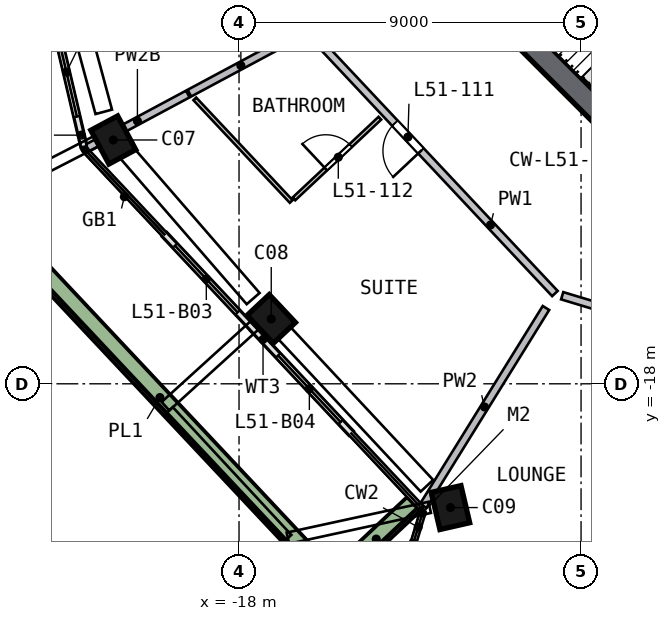
"""IFC4 building model, lengths in metres.
Left out: names, types, materials, properties, quantities, classifications, styles, units other than length and angle.
Written with IfcOpenShell. Run it as: python <this file> out.ifc"""

import sys

from ifc_helpers import new_model, si_unit, direction, frame, frame_2d, origin, origin_2d, place, context, subcontext, project, spatial, rectangle, extrude, element, fill, save


model = new_model("IFC4")
c1 = context("Model", 3, precision=1e-05, world=origin(), true_north=direction((0.0, 1.0)))
c2 = subcontext(c1, "Body", "Model", "MODEL_VIEW")
j1 = project(units=[si_unit("LENGTHUNIT", "METRE"), si_unit("PLANEANGLEUNIT", "RADIAN")], contexts=[c1])
p1 = place(None, origin())
s1 = spatial("IfcSite", under=j1, at=p1, CompositionType="ELEMENT")
p2 = place(p1, origin())
s2 = spatial("IfcBuilding", under=s1, at=p2, CompositionType="ELEMENT")
p3 = place(p2, frame((0.0, 0.0, 209.0)))
s3 = spatial("IfcBuildingStorey", under=s2, at=p3, CompositionType="ELEMENT", Elevation=209.0)
p4 = place(p3, frame((-21.376, -11.462, 0.0), z_axis=(0.055345312, -0.101187651, 0.993326711), x_axis=(-0.469249686, 0.875501932, 0.115330388)))
e1 = element("IfcColumn", 1, at=p4, inside=s3, PredefinedType="COLUMN", context=c2, shape_type="SweptSolid", body=[
    extrude(rectangle(XDim=1.0, YDim=0.8, at=origin_2d()), origin(), (0.0, 0.0, 1.0), 3.211),
])
p5 = place(p3, frame((-17.246, -16.195, 0.0), z_axis=(0.077721499, -0.081371824, 0.993648829), x_axis=(0.68019237, -0.724346074, -0.112521575)))
e2 = element("IfcColumn", 2, at=p5, inside=s3, PredefinedType="COLUMN", context=c2, shape_type="SweptSolid", body=[
    extrude(rectangle(XDim=1.0, YDim=0.8, at=origin_2d()), origin(), (0.0, 0.0, 1.0), 3.21),
])
p6 = place(p3, frame((-12.56, -21.186, 0.0), z_axis=(0.101242684, -0.058830208, 0.993120801), x_axis=(-0.221269095, 0.971915118, 0.080131083)))
e3 = element("IfcColumn", 3, at=p6, inside=s3, PredefinedType="COLUMN", context=c2, shape_type="SweptSolid", body=[
    extrude(rectangle(XDim=1.0, YDim=0.8, at=origin_2d()), origin(), (0.0, 0.0, 1.0), 3.212),
])
p7 = place(p3, frame((-13.788, -5.587, 0.0), z_axis=(0.0, 0.0, 1.0), x_axis=(0.707106781, -0.707106781, 0.0)))
e4 = element("IfcWall", 4, at=p7, inside=s3, PredefinedType="SHEAR", context=c2, shape_type="SweptSolid", body=[
    extrude(rectangle(XDim=11.598, YDim=0.6, at=frame_2d((5.799, 0.0))), origin(), (0.0, 0.0, 1.0), 3.5),
])
p8 = place(p7, frame((2.099, 0.0, 0.0)))
e5 = element("IfcOpeningElement", 5, at=p8, cuts=e4, PredefinedType="OPENING", context=c2, shape_type="SweptSolid", body=[
    extrude(rectangle(XDim=1.2, YDim=2.1, at=frame_2d((0.6, 1.05))), frame((0.0, 0.31, 0.0), z_axis=(0.0, -1.0, 0.0), x_axis=(1.0, 0.0, 0.0)), (0.0, 0.0, 1.0), 0.62),
])
p9 = place(p3, frame((-22.907, -8.24, 0.0), z_axis=(0.0, 0.0, 1.0), x_axis=(0.228341634, -0.973581069, 0.0)))
e6 = element("IfcWall", 6, at=p9, inside=s3, PredefinedType="SOLIDWALL", context=c2, shape_type="SweptSolid", body=[
    extrude(rectangle(XDim=3.608, YDim=0.15, at=frame_2d((1.804, 0.0))), origin(), (0.0, 0.0, 1.0), 2.475),
])
p10 = place(p9, frame((0.4, 0.0, 0.0)))
e7 = element("IfcOpeningElement", 7, at=p10, cuts=e6, PredefinedType="OPENING", context=c2, shape_type="SweptSolid", body=[
    extrude(rectangle(XDim=2.4, YDim=2.4, at=frame_2d((1.2, 1.2))), frame((0.0, 0.085, 0.0), z_axis=(0.0, -1.0, 0.0), x_axis=(1.0, 0.0, 0.0)), (0.0, 0.0, 1.0), 0.17),
])
p11 = place(p3, frame((-19.956, -14.076, 0.0), z_axis=(0.0, 0.0, 1.0), x_axis=(0.684533271, -0.728981619, 0.0)))
e8 = element("IfcWall", 8, at=p11, inside=s3, PredefinedType="SOLIDWALL", context=c2, shape_type="SweptSolid", body=[
    extrude(rectangle(XDim=3.4, YDim=0.15, at=frame_2d((1.7, 0.0))), origin(), (0.0, 0.0, 1.0), 2.475),
])
p12 = place(p11, frame((0.4, 0.0, 0.0)))
e9 = element("IfcOpeningElement", 9, at=p12, cuts=e8, PredefinedType="OPENING", context=c2, shape_type="SweptSolid", body=[
    extrude(rectangle(XDim=2.4, YDim=2.4, at=frame_2d((1.2, 1.2))), frame((0.0, 0.085, 0.0), z_axis=(0.0, -1.0, 0.0), x_axis=(1.0, 0.0, 0.0)), (0.0, 0.0, 1.0), 0.17),
])
p13 = place(p3, frame((-17.629, -16.555, 0.0), z_axis=(0.0, 0.0, 1.0), x_axis=(0.684558422, -0.728958001, 0.0)))
e10 = element("IfcWall", 10, at=p13, inside=s3, PredefinedType="SOLIDWALL", context=c2, shape_type="SweptSolid", body=[
    extrude(rectangle(XDim=3.761, YDim=0.15, at=frame_2d((1.881, 0.0))), origin(), (0.0, 0.0, 1.0), 2.475),
])
p14 = place(p13, frame((0.961, 0.0, 0.0)))
e11 = element("IfcOpeningElement", 11, at=p14, cuts=e10, PredefinedType="OPENING", context=c2, shape_type="SweptSolid", body=[
    extrude(rectangle(XDim=2.4, YDim=2.4, at=frame_2d((1.2, 1.2))), frame((0.0, 0.085, 0.0), z_axis=(0.0, -1.0, 0.0), x_axis=(1.0, 0.0, 0.0)), (0.0, 0.0, 1.0), 0.17),
])
p15 = place(p3, frame((-24.779, -13.36, 0.0), z_axis=(0.0, 0.0, 1.0), x_axis=(0.68453799, -0.728977188, 0.0)))
e12 = element("IfcWall", 12, at=p15, inside=s3, PredefinedType="SOLIDWALL", context=c2, shape_type="SweptSolid", body=[
    extrude(rectangle(XDim=13.724, YDim=0.5, at=frame_2d((6.862, 0.0))), origin(), (0.0, 0.0, 1.0), 0.7),
])
p16 = place(p3, frame((-15.373, -23.01, 0.0), z_axis=(0.0, 0.0, 1.0), x_axis=(0.728964327, 0.684551685, 0.0)))
e13 = element("IfcWall", 13, at=p16, inside=s3, PredefinedType="SOLIDWALL", context=c2, shape_type="SweptSolid", body=[
    extrude(rectangle(XDim=2.699, YDim=0.5, at=frame_2d((1.35, 0.0))), origin(), (0.0, 0.0, 1.0), 0.7),
])
p17 = place(p3, frame((-3.535, -9.334, 0.0), z_axis=(0.0, 0.0, 1.0), x_axis=(-0.707120946, 0.707092617, 0.0)))
e14 = element("IfcWall", 14, at=p17, inside=s3, PredefinedType="SOLIDWALL", context=c2, shape_type="SweptSolid", body=[
    extrude(rectangle(XDim=8.618, YDim=0.2, at=frame_2d((4.309, 0.0))), origin(), (0.0, 0.0, 1.0), 3.19),
])
p18 = place(p17, frame((6.6, 0.0, 0.0)))
e15 = element("IfcOpeningElement", 15, at=p18, cuts=e14, PredefinedType="OPENING", context=c2, shape_type="SweptSolid", body=[
    extrude(rectangle(XDim=1.2, YDim=2.1, at=frame_2d((0.6, 1.05))), frame((0.0, 0.11, 0.0), z_axis=(0.0, -1.0, 0.0), x_axis=(1.0, 0.0, 0.0)), (0.0, 0.0, 1.0), 0.22),
])
p19 = place(p3, frame((-9.688, -15.625, 0.0), z_axis=(0.0, 0.0, 1.0), x_axis=(-0.684549323, 0.728966545, 0.0)))
e16 = element("IfcWall", 16, at=p19, inside=s3, PredefinedType="SOLIDWALL", context=c2, shape_type="SweptSolid", body=[
    extrude(rectangle(XDim=9.317, YDim=0.2, at=frame_2d((4.658, 0.0))), origin(), (0.0, 0.0, 1.0), 3.19),
])
p20 = place(p19, frame((5.15, 0.0, 0.0)))
e17 = element("IfcOpeningElement", 17, at=p20, cuts=e16, PredefinedType="OPENING", context=c2, shape_type="SweptSolid", body=[
    extrude(rectangle(XDim=1.0, YDim=2.1, at=frame_2d((0.5, 1.05))), frame((0.0, 0.11, 0.0), z_axis=(0.0, -1.0, 0.0), x_axis=(1.0, 0.0, 0.0)), (0.0, 0.0, 1.0), 0.22),
])
p21 = place(p3, frame((-0.577, -18.376, 0.0), z_axis=(0.0, 0.0, 1.0), x_axis=(-0.957319229, 0.289032685, 0.0)))
e18 = element("IfcWall", 18, at=p21, inside=s3, PredefinedType="SOLIDWALL", context=c2, shape_type="SweptSolid", body=[
    extrude(rectangle(XDim=9.317, YDim=0.2, at=frame_2d((4.658, 0.0))), origin(), (0.0, 0.0, 1.0), 3.19),
])
p22 = place(p21, frame((3.869, 0.0, 0.0)))
e19 = element("IfcOpeningElement", 19, at=p22, cuts=e18, PredefinedType="OPENING", context=c2, shape_type="SweptSolid", body=[
    extrude(rectangle(XDim=1.8, YDim=2.1, at=frame_2d((0.9, 1.05))), frame((0.0, 0.11, 0.0), z_axis=(0.0, -1.0, 0.0), x_axis=(1.0, 0.0, 0.0)), (0.0, 0.0, 1.0), 0.22),
])
p23 = place(p3, frame((-19.347, -10.374, 0.0), z_axis=(0.0, 0.0, 1.0), x_axis=(-0.881302745, -0.472552084, 0.0)))
e20 = element("IfcWall", 20, at=p23, inside=s3, PredefinedType="SOLIDWALL", context=c2, shape_type="SweptSolid", body=[
    extrude(rectangle(XDim=3.011, YDim=0.2, at=frame_2d((1.506, 0.0))), origin(), (0.0, 0.0, 1.0), 2.69),
])
p24 = place(p3, frame((-16.597, -8.899, 0.0), z_axis=(0.0, 0.0, 1.0), x_axis=(-0.88131111, -0.472536482, 0.0)))
e21 = element("IfcWall", 21, at=p24, inside=s3, PredefinedType="SOLIDWALL", context=c2, shape_type="SweptSolid", body=[
    extrude(rectangle(XDim=3.075, YDim=0.2, at=frame_2d((1.537, 0.0))), origin(), (0.0, 0.0, 1.0), 3.19),
])
p25 = place(p3, frame((-13.155, -21.217, 0.0), z_axis=(0.0, 0.0, 1.0), x_axis=(0.526964401, 0.849887357, 0.0)))
e22 = element("IfcWall", 22, at=p25, inside=s3, PredefinedType="SOLIDWALL", context=c2, shape_type="SweptSolid", body=[
    extrude(rectangle(XDim=6.132, YDim=0.2, at=frame_2d((3.066, 0.0))), origin(), (0.0, 0.0, 1.0), 3.19),
])
p26 = place(p3, frame((-9.902, -26.999, 0.0), z_axis=(0.0, 0.0, 1.0), x_axis=(0.289037187, 0.95731787, 0.0)))
e23 = element("IfcWall", 23, at=p26, inside=s3, PredefinedType="SOLIDWALL", context=c2, shape_type="SweptSolid", body=[
    extrude(rectangle(XDim=10.75, YDim=0.2, at=frame_2d((5.375, 0.0))), origin(), (0.0, 0.0, 1.0), 2.69),
])
p27 = place(p26, frame((1.95, 0.0, 0.0)))
e24 = element("IfcOpeningElement", 24, at=p27, cuts=e23, PredefinedType="OPENING", context=c2, shape_type="SweptSolid", body=[
    extrude(rectangle(XDim=1.0, YDim=2.1, at=frame_2d((0.5, 1.05))), frame((0.0, 0.11, 0.0), z_axis=(0.0, -1.0, 0.0), x_axis=(1.0, 0.0, 0.0)), (0.0, 0.0, 1.0), 0.22),
])
p28 = place(p3, frame((-16.627, -13.202, 0.0), z_axis=(0.0, 0.0, 1.0), x_axis=(-0.684546009, 0.728969657, 0.0)))
e25 = element("IfcWall", 25, at=p28, inside=s3, PredefinedType="PARTITIONING", context=c2, shape_type="SweptSolid", body=[
    extrude(rectangle(XDim=3.704, YDim=0.1, at=frame_2d((1.852, 0.0))), origin(), (0.0, 0.0, 1.0), 3.19),
])
p29 = place(p3, frame((-16.554, -13.134, 0.0), z_axis=(0.0, 0.0, 1.0), x_axis=(0.728967156, 0.684548673, 0.0)))
e26 = element("IfcWall", 26, at=p29, inside=s3, PredefinedType="PARTITIONING", context=c2, shape_type="SweptSolid", body=[
    extrude(rectangle(XDim=3.1, YDim=0.1, at=frame_2d((1.55, 0.0))), origin(), (0.0, 0.0, 1.0), 3.19),
])
p30 = place(p29, frame((1.15, 0.0, 0.0)))
e27 = element("IfcOpeningElement", 27, at=p30, cuts=e26, PredefinedType="OPENING", context=c2, shape_type="SweptSolid", body=[
    extrude(rectangle(XDim=0.9, YDim=2.1, at=frame_2d((0.45, 1.05))), frame((0.0, 0.06, 0.0), z_axis=(0.0, -1.0, 0.0), x_axis=(1.0, 0.0, 0.0)), (0.0, 0.0, 1.0), 0.12),
])
p31 = place(p10, origin())
e28 = element("IfcDoor", 28, at=p31, inside=s3, OperationType="SLIDING_TO_RIGHT", PredefinedType="DOOR", context=c2, shape_type="SweptSolid", body=[
    extrude(rectangle(XDim=2.4, YDim=2.4, at=frame_2d((1.2, 1.2))), frame((0.0, 0.025, 0.0), z_axis=(0.0, -1.0, 0.0), x_axis=(1.0, 0.0, 0.0)), (0.0, 0.0, 1.0), 0.05),
])
fill(e7, e28)
p32 = place(p12, origin())
e29 = element("IfcDoor", 29, at=p32, inside=s3, OperationType="SLIDING_TO_RIGHT", PredefinedType="DOOR", context=c2, shape_type="SweptSolid", body=[
    extrude(rectangle(XDim=2.4, YDim=2.4, at=frame_2d((1.2, 1.2))), frame((0.0, 0.025, 0.0), z_axis=(0.0, -1.0, 0.0), x_axis=(1.0, 0.0, 0.0)), (0.0, 0.0, 1.0), 0.05),
])
fill(e9, e29)
p33 = place(p14, origin())
e30 = element("IfcDoor", 30, at=p33, inside=s3, OperationType="SLIDING_TO_LEFT", PredefinedType="DOOR", context=c2, shape_type="SweptSolid", body=[
    extrude(rectangle(XDim=2.4, YDim=2.4, at=frame_2d((1.2, 1.2))), frame((0.0, 0.025, 0.0), z_axis=(0.0, -1.0, 0.0), x_axis=(1.0, 0.0, 0.0)), (0.0, 0.0, 1.0), 0.05),
])
fill(e11, e30)
p34 = place(p20, origin())
e31 = element("IfcDoor", 31, at=p34, inside=s3, OperationType="SINGLE_SWING_LEFT", PredefinedType="DOOR", context=c2, shape_type="SweptSolid", body=[
    extrude(rectangle(XDim=1.0, YDim=2.1, at=frame_2d((0.5, 1.05))), frame((0.0, 0.025, 0.0), z_axis=(0.0, -1.0, 0.0), x_axis=(1.0, 0.0, 0.0)), (0.0, 0.0, 1.0), 0.05),
])
fill(e17, e31)
p35 = place(p30, origin())
e32 = element("IfcDoor", 32, at=p35, inside=s3, OperationType="SINGLE_SWING_LEFT", PredefinedType="DOOR", context=c2, shape_type="SweptSolid", body=[
    extrude(rectangle(XDim=0.9, YDim=2.1, at=frame_2d((0.45, 1.05))), frame((0.0, 0.025, 0.0), z_axis=(0.0, -1.0, 0.0), x_axis=(1.0, 0.0, 0.0)), (0.0, 0.0, 1.0), 0.05),
])
fill(e27, e32)
save(model, sys.argv[1])
